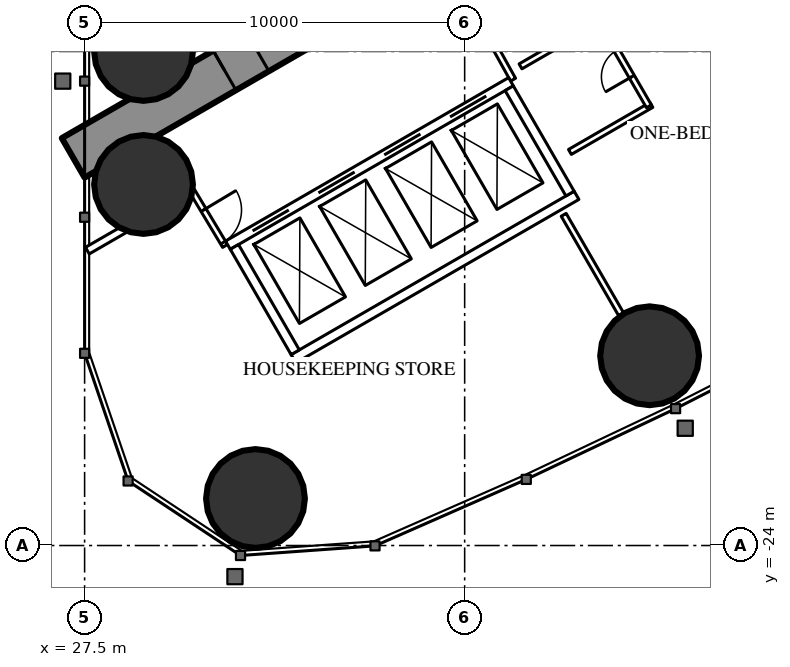
"""IFC4 building model, lengths in metres.
Left out: names, types, materials, properties, quantities, classifications, styles, units other than length and angle.
Written with IfcOpenShell. Run it as: python <this file> out.ifc"""

import sys

from ifc_helpers import new_model, si_unit, direction, frame, frame_2d, origin, origin_2d, place, context, subcontext, project, spatial, rectangle, hollow_circle, extrude, element, fill, save


model = new_model("IFC4")
c1 = context("Model", 3, precision=1e-05, world=origin(), true_north=direction((0.0, 1.0)))
c2 = subcontext(c1, "Body", "Model", "MODEL_VIEW")
j1 = project(units=[si_unit("LENGTHUNIT", "METRE"), si_unit("PLANEANGLEUNIT", "RADIAN")], contexts=[c1])
p1 = place(None, origin())
s1 = spatial("IfcSite", under=j1, at=p1, CompositionType="ELEMENT")
p2 = place(p1, origin())
s2 = spatial("IfcBuilding", under=s1, at=p2, CompositionType="ELEMENT")
p3 = place(p2, frame((0.0, 0.0, 132.6)))
s3 = spatial("IfcBuildingStorey", under=s2, at=p3, CompositionType="ELEMENT", Elevation=132.6)
for number, where, z_axis, x_axis in (
    (1, (31.996, -22.763, 0.0), (0.0, 0.0, 1.0), (1.0, 0.0, 0.0)),
    (2, (29.05, -11.0, 0.0), (0.0, 0.0, 1.0), (1.0, 0.0, 0.0)),
    (3, (29.05, -14.5, 0.0), (0.0, 0.0, 1.0), (1.0, 0.0, 0.0)),
    (4, (42.366, -19.007, 0.0), (0.0, 0.0, 1.0), (1.0, 0.0, 0.0)),
):
    element("IfcColumn", number, at=place(p3, frame(where, z_axis=z_axis, x_axis=x_axis)), inside=s3, PredefinedType="COLUMN", context=c2, shape_type="SweptSolid", body=[
        extrude(hollow_circle(Radius=1.3, WallThickness=0.1, at=origin_2d()), origin(), (0.0, 0.0, 1.0), 3.5),
    ])
p4 = place(p3, frame((27.2, -13.8, 0.0), z_axis=(0.0, 0.0, 1.0), x_axis=(0.866027159892, 0.499996958321, 0.0)))
e5 = element("IfcWall", 5, at=p4, inside=s3, PredefinedType="SHEAR", context=c2, shape_type="SweptSolid", body=[
    extrude(rectangle(XDim=27.947, YDim=1.2, at=frame_2d((13.973, 0.0))), origin(), (0.0, 0.0, 1.0), 3.5),
])
p5 = place(p4, frame((4.6, 0.0, 0.0)))
e6 = element("IfcOpeningElement", 6, at=p5, cuts=e5, PredefinedType="OPENING", context=c2, shape_type="SweptSolid", body=[
    extrude(rectangle(XDim=1.0, YDim=2.2, at=frame_2d((0.5, 1.1))), frame((0.0, 0.61, 0.0), z_axis=(0.0, -1.0, 0.0), x_axis=(1.0, 0.0, 0.0)), (0.0, 0.0, 1.0), 1.22),
])
p6 = place(p4, frame((13.395, 0.0, 0.0)))
e7 = element("IfcOpeningElement", 7, at=p6, cuts=e5, PredefinedType="OPENING", context=c2, shape_type="SweptSolid", body=[
    extrude(rectangle(XDim=1.8, YDim=2.2, at=frame_2d((0.9, 1.1))), frame((0.0, 0.61, 0.0), z_axis=(0.0, -1.0, 0.0), x_axis=(1.0, 0.0, 0.0)), (0.0, 0.0, 1.0), 1.22),
])
p7 = place(p3, frame((40.105, -15.299, 0.0), z_axis=(0.0, 0.0, 1.0), x_axis=(0.499978822259, -0.866037630414, 0.0)))
e8 = element("IfcWall", 8, at=p7, inside=s3, PredefinedType="PARTITIONING", context=c2, shape_type="SweptSolid", body=[
    extrude(rectangle(XDim=3.023, YDim=0.15, at=frame_2d((1.511, 0.0))), origin(), (0.0, 0.0, 1.0), 3.25),
])
p8 = place(p3, frame((27.572, -16.241, 0.0), z_axis=(0.0, 0.0, 1.0), x_axis=(0.866029654818, 0.499992636921, 0.0)))
e9 = element("IfcWall", 9, at=p8, inside=s3, PredefinedType="PARTITIONING", context=c2, shape_type="SweptSolid", body=[
    extrude(rectangle(XDim=3.155, YDim=0.2, at=frame_2d((1.577, 0.0))), origin(), (0.0, 0.0, 1.0), 3.25),
])
p9 = place(p3, frame((38.773, -11.742, 0.0), z_axis=(0.0, 0.0, 1.0), x_axis=(-0.485528096672, 0.8742210632, 0.0)))
e10 = element("IfcWall", 10, at=p9, inside=s3, PredefinedType="PARTITIONING", context=c2, shape_type="SweptSolid", body=[
    extrude(rectangle(XDim=1.805, YDim=0.15, at=frame_2d((0.903, 0.0))), origin(), (0.0, 0.0, 1.0), 3.25),
])
p10 = place(p3, frame((30.267, -14.569, 0.0), z_axis=(0.0, 0.0, 1.0), x_axis=(0.514336634837, -0.857588377991, 0.0)))
e11 = element("IfcWall", 11, at=p10, inside=s3, PredefinedType="PARTITIONING", context=c2, shape_type="SweptSolid", body=[
    extrude(rectangle(XDim=1.805, YDim=0.15, at=frame_2d((0.903, 0.0))), origin(), (0.0, 0.0, 1.0), 3.25),
])
p11 = place(p10, frame((0.703, 0.0, 0.0)))
e12 = element("IfcOpeningElement", 12, at=p11, cuts=e11, PredefinedType="OPENING", context=c2, shape_type="SweptSolid", body=[
    extrude(rectangle(XDim=1.0, YDim=2.2, at=frame_2d((0.5, 1.1))), frame((0.0, 0.085, 0.0), z_axis=(0.0, -1.0, 0.0), x_axis=(1.0, 0.0, 0.0)), (0.0, 0.0, 1.0), 0.17),
])
p12 = place(p3, frame((40.27, -13.644, 0.0), z_axis=(0.0, 0.0, 1.0), x_axis=(0.866031185235, 0.4999899861, 0.0)))
e13 = element("IfcWall", 13, at=p12, inside=s3, PredefinedType="PARTITIONING", context=c2, shape_type="SweptSolid", body=[
    extrude(rectangle(XDim=2.475, YDim=0.15, at=frame_2d((1.238, 0.0))), origin(), (0.0, 0.0, 1.0), 3.25),
])
p13 = place(p3, frame((41.048, -10.193, 0.0), z_axis=(0.0, 0.0, 1.0), x_axis=(0.500047596559, -0.865997922154, 0.0)))
e14 = element("IfcWall", 14, at=p13, inside=s3, PredefinedType="PARTITIONING", context=c2, shape_type="SweptSolid", body=[
    extrude(rectangle(XDim=2.6, YDim=0.15, at=frame_2d((1.3, 0.0))), origin(), (0.0, 0.0, 1.0), 3.25),
])
p14 = place(p13, frame((0.9, 0.0, 0.0)))
e15 = element("IfcOpeningElement", 15, at=p14, cuts=e14, PredefinedType="OPENING", context=c2, shape_type="SweptSolid", body=[
    extrude(rectangle(XDim=0.8, YDim=2.2, at=frame_2d((0.4, 1.1))), frame((0.0, 0.085, 0.0), z_axis=(0.0, -1.0, 0.0), x_axis=(1.0, 0.0, 0.0)), (0.0, 0.0, 1.0), 0.17),
])
p15 = place(p3, frame((38.97, -11.393, 0.0), z_axis=(0.0, 0.0, 1.0), x_axis=(0.866031185235, 0.4999899861, 0.0)))
e16 = element("IfcWall", 16, at=p15, inside=s3, PredefinedType="PARTITIONING", context=c2, shape_type="SweptSolid", body=[
    extrude(rectangle(XDim=2.475, YDim=0.15, at=frame_2d((1.238, 0.0))), origin(), (0.0, 0.0, 1.0), 3.25),
])
p16 = place(p3, frame((31.271, -16.097, 0.0), z_axis=(0.0, 0.0, 1.0), x_axis=(0.86604045752, 0.499973925258, 0.0)))
e17 = element("IfcWall", 17, at=p16, inside=s3, PredefinedType="PARTITIONING", context=c2, shape_type="SweptSolid", body=[
    extrude(rectangle(XDim=8.6, YDim=0.25, at=frame_2d((4.3, 0.0))), origin(), (0.0, 0.0, 1.0), 3.25),
])
p17 = place(p16, frame((0.75, 0.0, 0.0)))
e18 = element("IfcOpeningElement", 18, at=p17, cuts=e17, PredefinedType="OPENING", context=c2, shape_type="SweptSolid", body=[
    extrude(rectangle(XDim=1.1, YDim=2.2, at=frame_2d((0.55, 1.1))), frame((0.0, 0.135, 0.0), z_axis=(0.0, -1.0, 0.0), x_axis=(1.0, 0.0, 0.0)), (0.0, 0.0, 1.0), 0.27),
])
p18 = place(p16, frame((2.75, 0.0, 0.0)))
e19 = element("IfcOpeningElement", 19, at=p18, cuts=e17, PredefinedType="OPENING", context=c2, shape_type="SweptSolid", body=[
    extrude(rectangle(XDim=1.1, YDim=2.2, at=frame_2d((0.55, 1.1))), frame((0.0, 0.135, 0.0), z_axis=(0.0, -1.0, 0.0), x_axis=(1.0, 0.0, 0.0)), (0.0, 0.0, 1.0), 0.27),
])
p19 = place(p16, frame((4.75, 0.0, 0.0)))
e20 = element("IfcOpeningElement", 20, at=p19, cuts=e17, PredefinedType="OPENING", context=c2, shape_type="SweptSolid", body=[
    extrude(rectangle(XDim=1.1, YDim=2.2, at=frame_2d((0.55, 1.1))), frame((0.0, 0.135, 0.0), z_axis=(0.0, -1.0, 0.0), x_axis=(1.0, 0.0, 0.0)), (0.0, 0.0, 1.0), 0.27),
])
p20 = place(p16, frame((6.75, 0.0, 0.0)))
e21 = element("IfcOpeningElement", 21, at=p20, cuts=e17, PredefinedType="OPENING", context=c2, shape_type="SweptSolid", body=[
    extrude(rectangle(XDim=1.1, YDim=2.2, at=frame_2d((0.55, 1.1))), frame((0.0, 0.135, 0.0), z_axis=(0.0, -1.0, 0.0), x_axis=(1.0, 0.0, 0.0)), (0.0, 0.0, 1.0), 0.27),
])
p21 = place(p3, frame((32.996, -19.086, 0.0), z_axis=(0.0, 0.0, 1.0), x_axis=(0.866028165386, 0.499995216735, 0.0)))
e22 = element("IfcWall", 22, at=p21, inside=s3, PredefinedType="PARTITIONING", context=c2, shape_type="SweptSolid", body=[
    extrude(rectangle(XDim=8.6, YDim=0.25, at=frame_2d((4.3, 0.0))), origin(), (0.0, 0.0, 1.0), 3.25),
])
for number, where, z_axis, x_axis in (
    (23, (31.441, -16.143, 0.0), (0.0, 0.0, 1.0), (0.5, -0.866, 0.0)),
    (24, (38.673, -11.968, 0.0), (0.0, 0.0, 1.0), (0.5, -0.866, 0.0)),
):
    element("IfcWall", number, at=place(p3, frame(where, z_axis=z_axis, x_axis=x_axis)), inside=s3, PredefinedType="PARTITIONING", context=c2, shape_type="SweptSolid", body=[
        extrude(rectangle(XDim=3.201, YDim=0.25, at=frame_2d((1.6, 0.0))), origin(), (0.0, 0.0, 1.0), 3.25),
    ])
p22 = place(p14, origin())
e25 = element("IfcDoor", 25, at=p22, inside=s3, OperationType="SINGLE_SWING_RIGHT", PredefinedType="DOOR", context=c2, shape_type="SweptSolid", body=[
    extrude(rectangle(XDim=0.8, YDim=2.2, at=frame_2d((0.4, 1.1))), frame((0.0, 0.025, 0.0), z_axis=(0.0, -1.0, 0.0), x_axis=(1.0, 0.0, 0.0)), (0.0, 0.0, 1.0), 0.05),
])
fill(e15, e25)
p23 = place(p11, origin())
e26 = element("IfcDoor", 26, at=p23, inside=s3, OperationType="SINGLE_SWING_LEFT", PredefinedType="DOOR", context=c2, shape_type="SweptSolid", body=[
    extrude(rectangle(XDim=1.0, YDim=2.2, at=frame_2d((0.5, 1.1))), frame((0.0, 0.025, 0.0), z_axis=(0.0, -1.0, 0.0), x_axis=(1.0, 0.0, 0.0)), (0.0, 0.0, 1.0), 0.05),
])
fill(e12, e26)
p24 = place(p5, origin())
e27 = element("IfcDoor", 27, at=p24, inside=s3, OperationType="SINGLE_SWING_LEFT", PredefinedType="DOOR", context=c2, shape_type="SweptSolid", body=[
    extrude(rectangle(XDim=1.0, YDim=2.2, at=frame_2d((0.5, 1.1))), frame((0.0, 0.025, 0.0), z_axis=(0.0, -1.0, 0.0), x_axis=(1.0, 0.0, 0.0)), (0.0, 0.0, 1.0), 0.05),
])
fill(e6, e27)
p25 = place(p17, origin())
e28 = element("IfcDoor", 28, at=p25, inside=s3, OperationType="DOUBLE_DOOR_SLIDING", PredefinedType="USERDEFINED", context=c2, shape_type="SweptSolid", body=[
    extrude(rectangle(XDim=1.1, YDim=2.2, at=frame_2d((0.55, 1.1))), frame((0.0, 0.025, 0.0), z_axis=(0.0, -1.0, 0.0), x_axis=(1.0, 0.0, 0.0)), (0.0, 0.0, 1.0), 0.05),
])
fill(e18, e28)
p26 = place(p18, origin())
e29 = element("IfcDoor", 29, at=p26, inside=s3, OperationType="DOUBLE_DOOR_SLIDING", PredefinedType="USERDEFINED", context=c2, shape_type="SweptSolid", body=[
    extrude(rectangle(XDim=1.1, YDim=2.2, at=frame_2d((0.55, 1.1))), frame((0.0, 0.025, 0.0), z_axis=(0.0, -1.0, 0.0), x_axis=(1.0, 0.0, 0.0)), (0.0, 0.0, 1.0), 0.05),
])
fill(e19, e29)
p27 = place(p19, origin())
e30 = element("IfcDoor", 30, at=p27, inside=s3, OperationType="DOUBLE_DOOR_SLIDING", PredefinedType="USERDEFINED", context=c2, shape_type="SweptSolid", body=[
    extrude(rectangle(XDim=1.1, YDim=2.2, at=frame_2d((0.55, 1.1))), frame((0.0, 0.025, 0.0), z_axis=(0.0, -1.0, 0.0), x_axis=(1.0, 0.0, 0.0)), (0.0, 0.0, 1.0), 0.05),
])
fill(e20, e30)
p28 = place(p20, origin())
e31 = element("IfcDoor", 31, at=p28, inside=s3, OperationType="DOUBLE_DOOR_SLIDING", PredefinedType="USERDEFINED", context=c2, shape_type="SweptSolid", body=[
    extrude(rectangle(XDim=1.1, YDim=2.2, at=frame_2d((0.55, 1.1))), frame((0.0, 0.025, 0.0), z_axis=(0.0, -1.0, 0.0), x_axis=(1.0, 0.0, 0.0)), (0.0, 0.0, 1.0), 0.05),
])
fill(e21, e31)
save(model, sys.argv[1])
